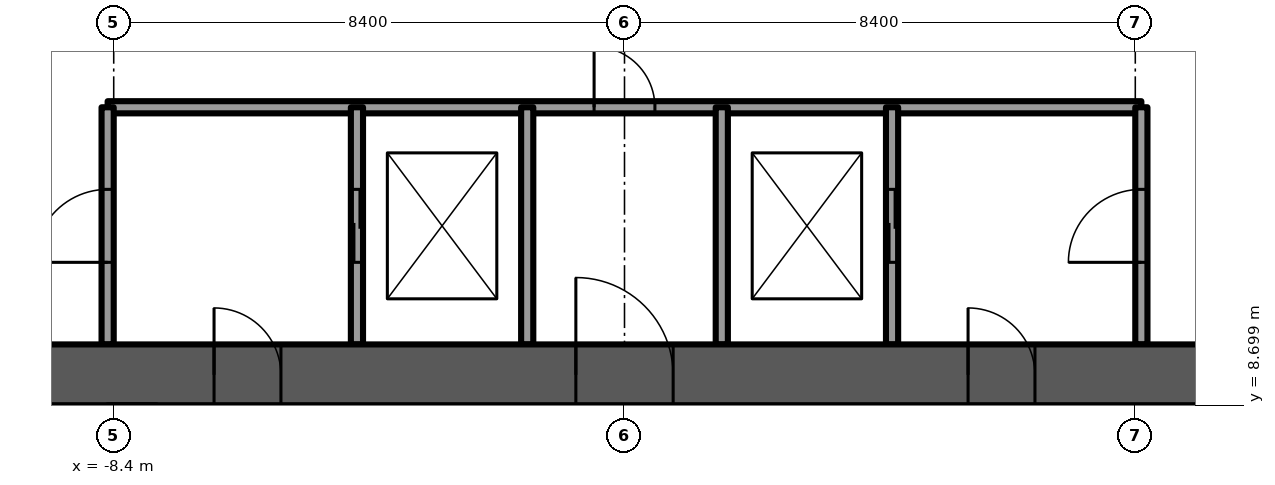
"""IFC4 building model, lengths in metres.
Left out: names, types, materials, properties, quantities, classifications, styles, units other than length and angle.
Written with IfcOpenShell. Run it as: python <this file> out.ifc"""

import sys

from ifc_helpers import new_model, si_unit, direction, frame, frame_2d, origin, place, context, subcontext, project, spatial, rectangle, extrude, element, fill, save


model = new_model("IFC4")
c1 = context("Model", 3, precision=1e-05, world=origin(), true_north=direction((0.0, 1.0)))
c2 = subcontext(c1, "Body", "Model", "MODEL_VIEW")
j1 = project(units=[si_unit("LENGTHUNIT", "METRE"), si_unit("PLANEANGLEUNIT", "RADIAN")], contexts=[c1])
p1 = place(None, origin())
s1 = spatial("IfcSite", under=j1, at=p1, CompositionType="ELEMENT")
p2 = place(p1, origin())
s2 = spatial("IfcBuilding", under=s1, at=p2, CompositionType="ELEMENT")
p3 = place(p2, frame((0.0, 0.0, 100.5)))
s3 = spatial("IfcBuildingStorey", under=s2, at=p3, CompositionType="ELEMENT", Elevation=100.5)
p4 = place(p3, frame((-12.0, 9.2, -0.3), z_axis=(0.0, 0.0, 1.0), x_axis=(1.0, 0.0, 0.0)))
e1 = element("IfcWall", 1, at=p4, inside=s3, PredefinedType="SHEAR", context=c2, shape_type="SweptSolid", body=[
    extrude(rectangle(XDim=24.0, YDim=1.0, at=frame_2d((12.0, 0.0))), origin(), (0.0, 0.0, 1.0), 3.75),
])
p5 = place(p4, frame((11.2, 0.0, 0.0)))
e2 = element("IfcOpeningElement", 2, at=p5, cuts=e1, PredefinedType="OPENING", context=c2, shape_type="SweptSolid", body=[
    extrude(rectangle(XDim=1.6, YDim=2.1, at=frame_2d((0.8, 1.05))), frame((0.0, 0.5, 0.0), z_axis=(0.0, -1.0, 0.0), x_axis=(1.0, 0.0, 0.0)), (0.0, 0.0, 1.0), 1.0),
])
p6 = place(p4, frame((5.25, 0.0, 0.0)))
e3 = element("IfcOpeningElement", 3, at=p6, cuts=e1, PredefinedType="OPENING", context=c2, shape_type="SweptSolid", body=[
    extrude(rectangle(XDim=1.1, YDim=2.1, at=frame_2d((0.55, 1.05))), frame((0.0, 0.5, 0.0), z_axis=(0.0, -1.0, 0.0), x_axis=(1.0, 0.0, 0.0)), (0.0, 0.0, 1.0), 1.0),
])
p7 = place(p4, frame((17.65, 0.0, 0.0)))
e4 = element("IfcOpeningElement", 4, at=p7, cuts=e1, PredefinedType="OPENING", context=c2, shape_type="SweptSolid", body=[
    extrude(rectangle(XDim=1.1, YDim=2.1, at=frame_2d((0.55, 1.05))), frame((0.0, 0.5, 0.0), z_axis=(0.0, -1.0, 0.0), x_axis=(1.0, 0.0, 0.0)), (0.0, 0.0, 1.0), 1.0),
])
p8 = place(p3, frame((-8.5, 13.6, 0.0), z_axis=(0.0, 0.0, 1.0), x_axis=(1.0, 0.0, 0.0)))
e5 = element("IfcWall", 5, at=p8, inside=s3, PredefinedType="PARTITIONING", context=c2, shape_type="SweptSolid", body=[
    extrude(rectangle(XDim=17.0, YDim=0.2, at=frame_2d((8.5, 0.0))), origin(), (0.0, 0.0, 1.0), 3.45),
])
p9 = place(p8, frame((8.0, 0.0, 0.0)))
e6 = element("IfcOpeningElement", 6, at=p9, cuts=e5, PredefinedType="OPENING", context=c2, shape_type="SweptSolid", body=[
    extrude(rectangle(XDim=1.0, YDim=2.1, at=frame_2d((0.5, 1.05))), frame((0.0, 0.1, 0.0), z_axis=(0.0, -1.0, 0.0), x_axis=(1.0, 0.0, 0.0)), (0.0, 0.0, 1.0), 0.2),
])
p10 = place(p3, frame((-8.5, 9.7, 0.0), z_axis=(0.0, 0.0, 1.0), x_axis=(0.0, 1.0, 0.0)))
e7 = element("IfcWall", 7, at=p10, inside=s3, PredefinedType="PARTITIONING", context=c2, shape_type="SweptSolid", body=[
    extrude(rectangle(XDim=3.9, YDim=0.2, at=frame_2d((1.95, 0.0))), origin(), (0.0, 0.0, 1.0), 3.45),
])
p11 = place(p10, frame((1.35, 0.0, 0.0)))
e8 = element("IfcOpeningElement", 8, at=p11, cuts=e7, PredefinedType="OPENING", context=c2, shape_type="SweptSolid", body=[
    extrude(rectangle(XDim=1.2, YDim=2.1, at=frame_2d((0.6, 1.05))), frame((0.0, 0.1, 0.0), z_axis=(0.0, -1.0, 0.0), x_axis=(1.0, 0.0, 0.0)), (0.0, 0.0, 1.0), 0.2),
])
p12 = place(p3, frame((8.5, 9.7, 0.0), z_axis=(0.0, 0.0, 1.0), x_axis=(0.0, 1.0, 0.0)))
e9 = element("IfcWall", 9, at=p12, inside=s3, PredefinedType="PARTITIONING", context=c2, shape_type="SweptSolid", body=[
    extrude(rectangle(XDim=3.9, YDim=0.2, at=frame_2d((1.95, 0.0))), origin(), (0.0, 0.0, 1.0), 3.45),
])
p13 = place(p12, frame((1.35, 0.0, 0.0)))
e10 = element("IfcOpeningElement", 10, at=p13, cuts=e9, PredefinedType="OPENING", context=c2, shape_type="SweptSolid", body=[
    extrude(rectangle(XDim=1.2, YDim=2.1, at=frame_2d((0.6, 1.05))), frame((0.0, 0.1, 0.0), z_axis=(0.0, -1.0, 0.0), x_axis=(1.0, 0.0, 0.0)), (0.0, 0.0, 1.0), 0.2),
])
p14 = place(p3, frame((-4.4, 9.7, 0.0), z_axis=(0.0, 0.0, 1.0), x_axis=(0.0, 1.0, 0.0)))
e11 = element("IfcWall", 11, at=p14, inside=s3, PredefinedType="PARTITIONING", context=c2, shape_type="SweptSolid", body=[
    extrude(rectangle(XDim=3.9, YDim=0.2, at=frame_2d((1.95, 0.0))), origin(), (0.0, 0.0, 1.0), 3.45),
])
p15 = place(p14, frame((1.35, 0.0, 0.0)))
e12 = element("IfcOpeningElement", 12, at=p15, cuts=e11, PredefinedType="OPENING", context=c2, shape_type="SweptSolid", body=[
    extrude(rectangle(XDim=1.2, YDim=2.1, at=frame_2d((0.6, 1.05))), frame((0.0, 0.1, 0.0), z_axis=(0.0, -1.0, 0.0), x_axis=(1.0, 0.0, 0.0)), (0.0, 0.0, 1.0), 0.2),
])
p16 = place(p3, frame((4.4, 9.7, 0.0), z_axis=(0.0, 0.0, 1.0), x_axis=(0.0, 1.0, 0.0)))
e13 = element("IfcWall", 13, at=p16, inside=s3, PredefinedType="PARTITIONING", context=c2, shape_type="SweptSolid", body=[
    extrude(rectangle(XDim=3.9, YDim=0.2, at=frame_2d((1.95, 0.0))), origin(), (0.0, 0.0, 1.0), 3.45),
])
p17 = place(p16, frame((1.35, 0.0, 0.0)))
e14 = element("IfcOpeningElement", 14, at=p17, cuts=e13, PredefinedType="OPENING", context=c2, shape_type="SweptSolid", body=[
    extrude(rectangle(XDim=1.2, YDim=2.1, at=frame_2d((0.6, 1.05))), frame((0.0, 0.1, 0.0), z_axis=(0.0, -1.0, 0.0), x_axis=(1.0, 0.0, 0.0)), (0.0, 0.0, 1.0), 0.2),
])
for number, where, z_axis, x_axis in (
    (15, (-1.6, 9.7, 0.0), (0.0, 0.0, 1.0), (0.0, 1.0, 0.0)),
    (16, (1.6, 9.7, 0.0), (0.0, 0.0, 1.0), (0.0, 1.0, 0.0)),
):
    element("IfcWall", number, at=place(p3, frame(where, z_axis=z_axis, x_axis=x_axis)), inside=s3, PredefinedType="PARTITIONING", context=c2, shape_type="SweptSolid", body=[
        extrude(rectangle(XDim=3.9, YDim=0.2, at=frame_2d((1.95, 0.0))), origin(), (0.0, 0.0, 1.0), 3.45),
    ])
p18 = place(p5, origin())
e17 = element("IfcDoor", 17, at=p18, inside=s3, OperationType="DOUBLE_DOOR_SINGLE_SWING", PredefinedType="DOOR", context=c2, shape_type="SweptSolid", body=[
    extrude(rectangle(XDim=1.6, YDim=2.1, at=frame_2d((0.8, 1.05))), frame((0.0, 0.025, 0.0), z_axis=(0.0, -1.0, 0.0), x_axis=(1.0, 0.0, 0.0)), (0.0, 0.0, 1.0), 0.05),
])
fill(e2, e17)
p19 = place(p6, origin())
e18 = element("IfcDoor", 18, at=p19, inside=s3, OperationType="SINGLE_SWING_LEFT", PredefinedType="DOOR", context=c2, shape_type="SweptSolid", body=[
    extrude(rectangle(XDim=1.1, YDim=2.1, at=frame_2d((0.55, 1.05))), frame((0.0, 0.025, 0.0), z_axis=(0.0, -1.0, 0.0), x_axis=(1.0, 0.0, 0.0)), (0.0, 0.0, 1.0), 0.05),
])
fill(e3, e18)
p20 = place(p7, origin())
e19 = element("IfcDoor", 19, at=p20, inside=s3, OperationType="SINGLE_SWING_RIGHT", PredefinedType="DOOR", context=c2, shape_type="SweptSolid", body=[
    extrude(rectangle(XDim=1.1, YDim=2.1, at=frame_2d((0.55, 1.05))), frame((0.0, 0.025, 0.0), z_axis=(0.0, -1.0, 0.0), x_axis=(1.0, 0.0, 0.0)), (0.0, 0.0, 1.0), 0.05),
])
fill(e4, e19)
p21 = place(p15, origin())
e20 = element("IfcDoor", 20, at=p21, inside=s3, OperationType="SLIDING_TO_LEFT", PredefinedType="DOOR", context=c2, shape_type="SweptSolid", body=[
    extrude(rectangle(XDim=1.2, YDim=2.1, at=frame_2d((0.6, 1.05))), frame((0.0, 0.025, 0.0), z_axis=(0.0, -1.0, 0.0), x_axis=(1.0, 0.0, 0.0)), (0.0, 0.0, 1.0), 0.05),
])
fill(e12, e20)
p22 = place(p11, origin())
e21 = element("IfcDoor", 21, at=p22, inside=s3, OperationType="SINGLE_SWING_LEFT", PredefinedType="DOOR", context=c2, shape_type="SweptSolid", body=[
    extrude(rectangle(XDim=1.2, YDim=2.1, at=frame_2d((0.6, 1.05))), frame((0.0, 0.025, 0.0), z_axis=(0.0, -1.0, 0.0), x_axis=(1.0, 0.0, 0.0)), (0.0, 0.0, 1.0), 0.05),
])
fill(e8, e21)
p23 = place(p17, origin())
e22 = element("IfcDoor", 22, at=p23, inside=s3, OperationType="SLIDING_TO_LEFT", PredefinedType="DOOR", context=c2, shape_type="SweptSolid", body=[
    extrude(rectangle(XDim=1.2, YDim=2.1, at=frame_2d((0.6, 1.05))), frame((0.0, 0.025, 0.0), z_axis=(0.0, -1.0, 0.0), x_axis=(1.0, 0.0, 0.0)), (0.0, 0.0, 1.0), 0.05),
])
fill(e14, e22)
p24 = place(p13, origin())
e23 = element("IfcDoor", 23, at=p24, inside=s3, OperationType="SINGLE_SWING_LEFT", PredefinedType="DOOR", context=c2, shape_type="SweptSolid", body=[
    extrude(rectangle(XDim=1.2, YDim=2.1, at=frame_2d((0.6, 1.05))), frame((0.0, 0.025, 0.0), z_axis=(0.0, -1.0, 0.0), x_axis=(1.0, 0.0, 0.0)), (0.0, 0.0, 1.0), 0.05),
])
fill(e10, e23)
p25 = place(p9, origin())
e24 = element("IfcDoor", 24, at=p25, inside=s3, OperationType="SINGLE_SWING_LEFT", PredefinedType="DOOR", context=c2, shape_type="SweptSolid", body=[
    extrude(rectangle(XDim=1.0, YDim=2.1, at=frame_2d((0.5, 1.05))), frame((0.0, 0.025, 0.0), z_axis=(0.0, -1.0, 0.0), x_axis=(1.0, 0.0, 0.0)), (0.0, 0.0, 1.0), 0.05),
])
fill(e6, e24)
save(model, sys.argv[1])
